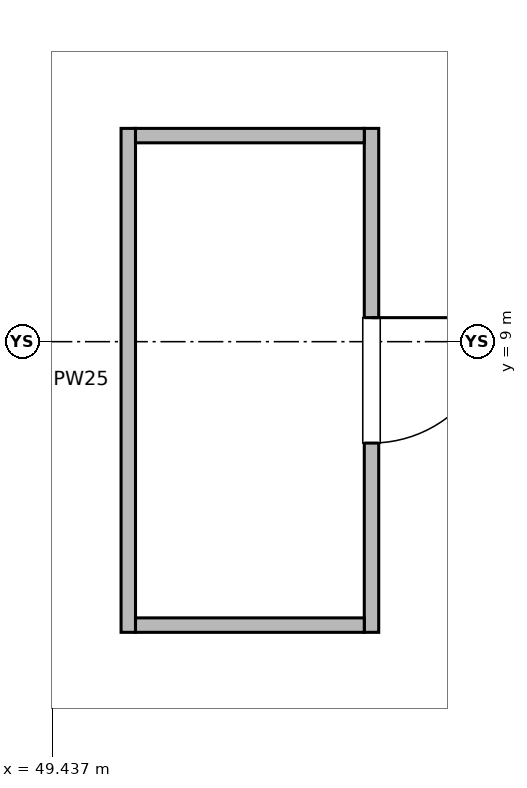
"""IFC4 building model, lengths in metres.
Left out: names, types, materials, properties, quantities, classifications, styles, units other than length and angle.
Written with IfcOpenShell. Run it as: python <this file> out.ifc"""

import sys

from ifc_helpers import new_model, si_unit, direction, frame, frame_2d, origin, place, context, subcontext, project, spatial, rectangle, extrude, element, fill, save


model = new_model("IFC4")
c1 = context("Model", 3, precision=1e-05, world=origin(), true_north=direction((0.0, 1.0)))
c2 = subcontext(c1, "Body", "Model", "MODEL_VIEW")
j1 = project(units=[si_unit("LENGTHUNIT", "METRE"), si_unit("PLANEANGLEUNIT", "RADIAN")], contexts=[c1])
p1 = place(None, origin())
s1 = spatial("IfcSite", under=j1, at=p1, CompositionType="ELEMENT")
p2 = place(p1, origin())
s2 = spatial("IfcBuilding", under=s1, at=p2, CompositionType="ELEMENT")
p3 = place(p2, frame((0.0, 0.0, -6.0)))
s3 = spatial("IfcBuildingStorey", under=s2, at=p3, CompositionType="ELEMENT", Elevation=-6.0)
p4 = place(p3, frame((53.639, 11.806, 0.0), z_axis=(0.0, 0.0, 1.0), x_axis=(0.0, -1.0, 0.0)))
e1 = element("IfcWall", 1, at=p4, inside=s3, PredefinedType="PARTITIONING", context=c2, shape_type="SweptSolid", body=[
    extrude(rectangle(XDim=6.63, YDim=0.19, at=frame_2d((3.315, 0.0))), origin(), (0.0, 0.0, 1.0), 5.02),
])
p5 = place(p4, frame((2.49, 0.0, 0.0)))
e2 = element("IfcOpeningElement", 2, at=p5, cuts=e1, PredefinedType="OPENING", context=c2, shape_type="SweptSolid", body=[
    extrude(rectangle(XDim=1.65, YDim=2.3, at=frame_2d((0.825, 1.15))), frame((0.0, 0.105, 0.0), z_axis=(0.0, -1.0, 0.0), x_axis=(1.0, 0.0, 0.0)), (0.0, 0.0, 1.0), 0.21),
])
p6 = place(p3, frame((50.439, 5.176, 0.0), z_axis=(0.0, 0.0, 1.0), x_axis=(0.0, 1.0, 0.0)))
e3 = element("IfcWall", 3, at=p6, inside=s3, PredefinedType="PARTITIONING", context=c2, shape_type="SweptSolid", body=[
    extrude(rectangle(XDim=6.63, YDim=0.19, at=frame_2d((3.315, 0.0))), origin(), (0.0, 0.0, 1.0), 5.02),
])
for number, where, z_axis, x_axis in (
    (4, (50.534, 5.271, 0.0), (0.0, 0.0, 1.0), (1.0, 0.0, 0.0)),
    (5, (50.534, 11.711, 0.0), (0.0, 0.0, 1.0), (1.0, 0.0, 0.0)),
):
    element("IfcWall", number, at=place(p3, frame(where, z_axis=z_axis, x_axis=x_axis)), inside=s3, PredefinedType="PARTITIONING", context=c2, shape_type="SweptSolid", body=[
        extrude(rectangle(XDim=3.01, YDim=0.19, at=frame_2d((1.505, 0.0))), origin(), (0.0, 0.0, 1.0), 5.02),
    ])
p7 = place(p5, origin())
e6 = element("IfcDoor", 6, at=p7, inside=s3, OperationType="SINGLE_SWING_LEFT", PredefinedType="DOOR", context=c2, shape_type="SweptSolid", body=[
    extrude(rectangle(XDim=1.65, YDim=2.3, at=frame_2d((0.825, 1.15))), frame((0.0, 0.025, 0.0), z_axis=(0.0, -1.0, 0.0), x_axis=(1.0, 0.0, 0.0)), (0.0, 0.0, 1.0), 0.05),
])
fill(e2, e6)
save(model, sys.argv[1])
